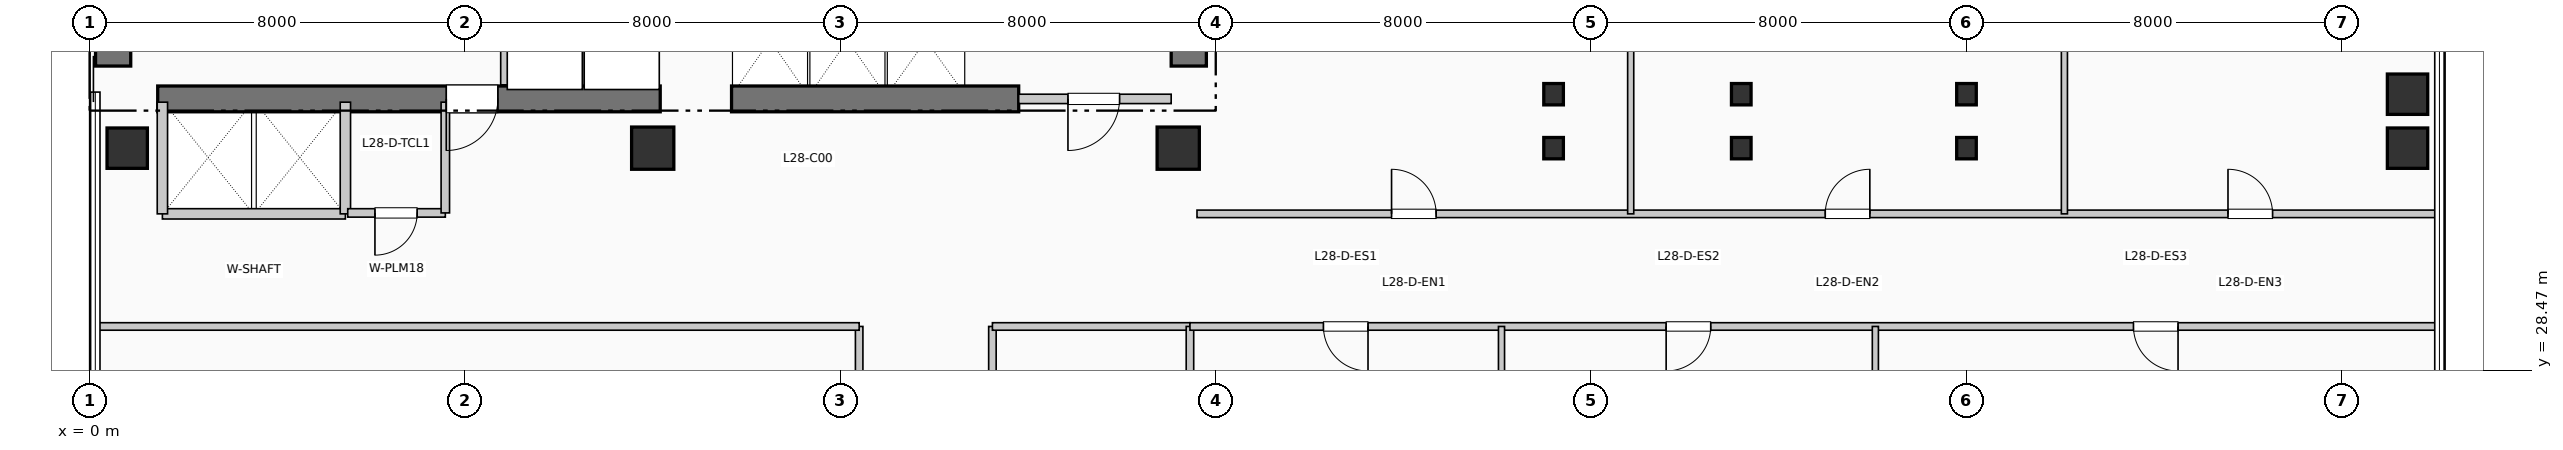
"""IFC4 building model, lengths in metres.
Left out: names, types, materials, properties, quantities, classifications, styles, units other than length and angle.
Written with IfcOpenShell. Run it as: python <this file> out.ifc"""

import sys

from ifc_helpers import new_model, si_unit, direction, frame, frame_2d, origin, origin_2d, place, context, subcontext, project, spatial, rectangle, i_section, extrude, element, fill, save


model = new_model("IFC4")
c1 = context("Model", 3, precision=1e-05, world=origin(), true_north=direction((0.0, 1.0)))
c2 = subcontext(c1, "Body", "Model", "MODEL_VIEW")
j1 = project(units=[si_unit("LENGTHUNIT", "METRE"), si_unit("PLANEANGLEUNIT", "RADIAN")], contexts=[c1])
p1 = place(None, origin())
s1 = spatial("IfcSite", under=j1, at=p1, CompositionType="ELEMENT")
p2 = place(p1, origin())
s2 = spatial("IfcBuilding", under=s1, at=p2, CompositionType="ELEMENT")
p3 = place(p2, frame((0.0, 0.0, 118.47)))
s3 = spatial("IfcBuildingStorey", under=s2, at=p3, CompositionType="ELEMENT", Elevation=118.47)
p4 = place(p3, frame((0.5, 34.95, 0.0), z_axis=(0.0, 0.0, 1.0), x_axis=(0.0, 1.0, 0.0)))
e1 = element("IfcWall", 1, at=p4, inside=s3, PredefinedType="SHEAR", context=c2, shape_type="SweptSolid", body=[
    extrude(rectangle(XDim=7.9, YDim=0.75, at=frame_2d((3.95, 0.0))), origin(), (0.0, 0.0, 1.0), 3.96),
])
p5 = place(p3, frame((23.425, 34.95, 0.0), z_axis=(0.0, 0.0, 1.0), x_axis=(0.0, 1.0, 0.0)))
e2 = element("IfcWall", 2, at=p5, inside=s3, PredefinedType="SHEAR", context=c2, shape_type="SweptSolid", body=[
    extrude(rectangle(XDim=10.64, YDim=0.75, at=frame_2d((5.32, 0.0))), origin(), (0.0, 0.0, 1.0), 3.96),
])
p6 = place(p3, frame((1.45, 34.25, 0.0), z_axis=(0.0, 0.0, 1.0), x_axis=(1.0, 0.0, 0.0)))
e3 = element("IfcWall", 3, at=p6, inside=s3, PredefinedType="SHEAR", context=c2, shape_type="SweptSolid", body=[
    extrude(rectangle(XDim=10.71, YDim=0.55, at=frame_2d((5.355, 0.0))), origin(), (0.0, 0.0, 1.0), 3.96),
])
p7 = place(p6, frame((7.25, 0.0, 0.0), z_axis=(0.0, 0.0, 1.0), x_axis=(-1.0, 0.0, 0.0)))
e4 = element("IfcOpeningElement", 4, at=p7, cuts=e3, PredefinedType="OPENING", context=c2, shape_type="SweptSolid", body=[
    extrude(rectangle(XDim=1.1, YDim=2.15, at=frame_2d((0.55, 1.075))), frame((0.0, 0.285, 0.0), z_axis=(0.0, -1.0, 0.0), x_axis=(1.0, 0.0, 0.0)), (0.0, 0.0, 1.0), 0.57),
])
p8 = place(p3, frame((13.68, 34.25, 0.0), z_axis=(0.0, 0.0, 1.0), x_axis=(1.0, 0.0, 0.0)))
e5 = element("IfcWall", 5, at=p8, inside=s3, PredefinedType="SHEAR", context=c2, shape_type="SweptSolid", body=[
    extrude(rectangle(XDim=6.12, YDim=0.55, at=frame_2d((3.06, 0.0))), origin(), (0.0, 0.0, 1.0), 3.96),
])
p9 = place(p3, frame((0.8, 33.2, 0.0), z_axis=(0.0, 0.0, 1.0), x_axis=(1.0, 0.0, 0.0)))
e6 = element("IfcColumn", 6, at=p9, inside=s3, PredefinedType="COLUMN", context=c2, shape_type="SweptSolid", body=[
    extrude(rectangle(XDim=0.86, YDim=0.86, at=origin_2d()), origin(), (0.0, 0.0, 1.0), 3.96),
])
for number, where, z_axis, x_axis in (
    (7, (12.0, 33.2, 0.0), (0.0, 0.0, 1.0), (1.0, 0.0, 0.0)),
    (8, (23.2, 33.2, 0.0), (0.0, 0.0, 1.0), (1.0, 0.0, 0.0)),
):
    element("IfcColumn", number, at=place(p3, frame(where, z_axis=z_axis, x_axis=x_axis)), inside=s3, PredefinedType="COLUMN", context=c2, shape_type="SweptSolid", body=[
        extrude(rectangle(XDim=0.9, YDim=0.9, at=origin_2d()), origin(), (0.0, 0.0, 1.0), 3.96),
    ])
for number, where, z_axis, x_axis in (
    (9, (31.2, 33.2, 0.0), (0.0, 0.0, 1.0), (1.0, 0.0, 0.0)),
    (10, (31.2, 34.35, 0.0), (0.0, 0.0, 1.0), (1.0, 0.0, 0.0)),
    (11, (35.2, 33.2, 0.0), (0.0, 0.0, 1.0), (1.0, 0.0, 0.0)),
    (12, (35.2, 34.35, 0.0), (0.0, 0.0, 1.0), (1.0, 0.0, 0.0)),
    (13, (40.0, 33.2, 0.0), (0.0, 0.0, 1.0), (1.0, 0.0, 0.0)),
    (14, (40.0, 34.35, 0.0), (0.0, 0.0, 1.0), (1.0, 0.0, 0.0)),
):
    element("IfcColumn", number, at=place(p3, frame(where, z_axis=z_axis, x_axis=x_axis)), inside=s3, PredefinedType="COLUMN", context=c2, shape_type="SweptSolid", body=[
        extrude(i_section(OverallWidth=0.418, OverallDepth=0.455, WebThickness=0.032, FlangeThickness=0.051, at=origin_2d()), origin(), (0.0, 0.0, 1.0), 3.96),
    ])
for number, where, z_axis, x_axis in (
    (15, (49.4, 33.2, 0.0), (0.0, 0.0, 1.0), (1.0, 0.0, 0.0)),
    (16, (49.4, 34.35, 0.0), (0.0, 0.0, 1.0), (1.0, 0.0, 0.0)),
):
    element("IfcColumn", number, at=place(p3, frame(where, z_axis=z_axis, x_axis=x_axis)), inside=s3, PredefinedType="COLUMN", context=c2, shape_type="SweptSolid", body=[
        extrude(rectangle(XDim=0.86, YDim=0.86, at=origin_2d()), origin(), (0.0, 0.0, 1.0), 3.96),
    ])
p10 = place(p3, frame((8.86, 34.55, 0.0), z_axis=(0.0, 0.0, 1.0), x_axis=(0.0, 1.0, 0.0)))
e17 = element("IfcWall", 17, at=p10, inside=s3, PredefinedType="PARTITIONING", context=c2, shape_type="SweptSolid", body=[
    extrude(rectangle(XDim=2.5, YDim=0.2, at=frame_2d((1.25, 0.0))), origin(), (0.0, 0.0, 1.0), 3.71),
])
p11 = place(p3, frame((19.8, 34.25, 0.0), z_axis=(0.0, 0.0, 1.0), x_axis=(1.0, 0.0, 0.0)))
e18 = element("IfcWall", 18, at=p11, inside=s3, PredefinedType="PARTITIONING", context=c2, shape_type="SweptSolid", body=[
    extrude(rectangle(XDim=3.25, YDim=0.2, at=frame_2d((1.625, 0.0))), origin(), (0.0, 0.0, 1.0), 3.71),
])
p12 = place(p11, frame((2.15, 0.0, 0.0), z_axis=(0.0, 0.0, 1.0), x_axis=(-1.0, 0.0, 0.0)))
e19 = element("IfcOpeningElement", 19, at=p12, cuts=e18, PredefinedType="OPENING", context=c2, shape_type="SweptSolid", body=[
    extrude(rectangle(XDim=1.1, YDim=2.15, at=frame_2d((0.55, 1.075))), frame((0.0, 0.11, 0.0), z_axis=(0.0, -1.0, 0.0), x_axis=(1.0, 0.0, 0.0)), (0.0, 0.0, 1.0), 0.22),
])
p13 = place(p3, frame((1.55, 31.8, 0.0), z_axis=(0.0, 0.0, 1.0), x_axis=(1.0, 0.0, 0.0)))
e20 = element("IfcWall", 20, at=p13, inside=s3, PredefinedType="PARTITIONING", context=c2, shape_type="SweptSolid", body=[
    extrude(rectangle(XDim=3.9, YDim=0.22, at=frame_2d((1.95, 0.0))), origin(), (0.0, 0.0, 1.0), 3.71),
])
for number, where, z_axis, x_axis in (
    (21, (1.55, 31.8, 0.0), (0.0, 0.0, 1.0), (0.0, 1.0, 0.0)),
    (22, (5.45, 31.8, 0.0), (0.0, 0.0, 1.0), (0.0, 1.0, 0.0)),
):
    element("IfcWall", number, at=place(p3, frame(where, z_axis=z_axis, x_axis=x_axis)), inside=s3, PredefinedType="PARTITIONING", context=c2, shape_type="SweptSolid", body=[
        extrude(rectangle(XDim=2.38, YDim=0.22, at=frame_2d((1.19, 0.0))), origin(), (0.0, 0.0, 1.0), 3.71),
    ])
p14 = place(p3, frame((5.5, 31.82, 0.0), z_axis=(0.0, 0.0, 1.0), x_axis=(1.0, 0.0, 0.0)))
e23 = element("IfcWall", 23, at=p14, inside=s3, PredefinedType="PLUMBINGWALL", context=c2, shape_type="SweptSolid", body=[
    extrude(rectangle(XDim=2.08, YDim=0.18, at=frame_2d((1.04, 0.0))), origin(), (0.0, 0.0, 1.0), 3.71),
])
p15 = place(p14, frame((1.48, 0.0, 0.0), z_axis=(0.0, 0.0, 1.0), x_axis=(-1.0, 0.0, 0.0)))
e24 = element("IfcOpeningElement", 24, at=p15, cuts=e23, PredefinedType="OPENING", context=c2, shape_type="SweptSolid", body=[
    extrude(rectangle(XDim=0.9, YDim=2.1, at=frame_2d((0.45, 1.05))), frame((0.0, 0.1, 0.0), z_axis=(0.0, -1.0, 0.0), x_axis=(1.0, 0.0, 0.0)), (0.0, 0.0, 1.0), 0.2),
])
p16 = place(p3, frame((7.58, 31.82, 0.0), z_axis=(0.0, 0.0, 1.0), x_axis=(0.0, 1.0, 0.0)))
e25 = element("IfcWall", 25, at=p16, inside=s3, PredefinedType="PLUMBINGWALL", context=c2, shape_type="SweptSolid", body=[
    extrude(rectangle(XDim=2.36, YDim=0.18, at=frame_2d((1.18, 0.0))), origin(), (0.0, 0.0, 1.0), 3.71),
])
p17 = place(p3, frame((16.4, 7.2, 0.0), z_axis=(0.0, 0.0, 1.0), x_axis=(0.0, 1.0, 0.0)))
e26 = element("IfcWall", 26, at=p17, inside=s3, PredefinedType="PARTITIONING", context=c2, shape_type="SweptSolid", body=[
    extrude(rectangle(XDim=22.2, YDim=0.16, at=frame_2d((11.1, 0.0))), origin(), (0.0, 0.0, 1.0), 3.71),
])
p18 = place(p17, frame((6.247, 0.0, 0.0), z_axis=(0.0, 0.0, 1.0), x_axis=(-1.0, 0.0, 0.0)))
e27 = element("IfcOpeningElement", 27, at=p18, cuts=e26, PredefinedType="OPENING", context=c2, shape_type="SweptSolid", body=[
    extrude(rectangle(XDim=0.95, YDim=2.15, at=frame_2d((0.475, 1.075))), frame((0.0, 0.09, 0.0), z_axis=(0.0, -1.0, 0.0), x_axis=(1.0, 0.0, 0.0)), (0.0, 0.0, 1.0), 0.18),
])
p19 = place(p17, frame((17.347, 0.0, 0.0), z_axis=(0.0, 0.0, 1.0), x_axis=(-1.0, 0.0, 0.0)))
e28 = element("IfcOpeningElement", 28, at=p19, cuts=e26, PredefinedType="OPENING", context=c2, shape_type="SweptSolid", body=[
    extrude(rectangle(XDim=0.95, YDim=2.15, at=frame_2d((0.475, 1.075))), frame((0.0, 0.09, 0.0), z_axis=(0.0, -1.0, 0.0), x_axis=(1.0, 0.0, 0.0)), (0.0, 0.0, 1.0), 0.18),
])
p20 = place(p3, frame((19.24, 7.2, 0.0), z_axis=(0.0, 0.0, 1.0), x_axis=(0.0, 1.0, 0.0)))
e29 = element("IfcWall", 29, at=p20, inside=s3, PredefinedType="PARTITIONING", context=c2, shape_type="SweptSolid", body=[
    extrude(rectangle(XDim=22.2, YDim=0.16, at=frame_2d((11.1, 0.0))), origin(), (0.0, 0.0, 1.0), 3.71),
])
p21 = place(p20, frame((4.52, 0.0, 0.0)))
e30 = element("IfcOpeningElement", 30, at=p21, cuts=e29, PredefinedType="OPENING", context=c2, shape_type="SweptSolid", body=[
    extrude(rectangle(XDim=0.95, YDim=2.15, at=frame_2d((0.475, 1.075))), frame((0.0, 0.09, 0.0), z_axis=(0.0, -1.0, 0.0), x_axis=(1.0, 0.0, 0.0)), (0.0, 0.0, 1.0), 0.18),
])
p22 = place(p20, frame((15.62, 0.0, 0.0)))
e31 = element("IfcOpeningElement", 31, at=p22, cuts=e29, PredefinedType="OPENING", context=c2, shape_type="SweptSolid", body=[
    extrude(rectangle(XDim=0.95, YDim=2.15, at=frame_2d((0.475, 1.075))), frame((0.0, 0.09, 0.0), z_axis=(0.0, -1.0, 0.0), x_axis=(1.0, 0.0, 0.0)), (0.0, 0.0, 1.0), 0.18),
])
p23 = place(p3, frame((0.19, 29.4, 0.0), z_axis=(0.0, 0.0, 1.0), x_axis=(1.0, 0.0, 0.0)))
e32 = element("IfcWall", 32, at=p23, inside=s3, PredefinedType="PARTITIONING", context=c2, shape_type="SweptSolid", body=[
    extrude(rectangle(XDim=16.21, YDim=0.16, at=frame_2d((8.105, 0.0))), origin(), (0.0, 0.0, 1.0), 3.365),
])
p24 = place(p3, frame((19.24, 29.4, 0.0), z_axis=(0.0, 0.0, 1.0), x_axis=(1.0, 0.0, 0.0)))
e33 = element("IfcWall", 33, at=p24, inside=s3, PredefinedType="PARTITIONING", context=c2, shape_type="SweptSolid", body=[
    extrude(rectangle(XDim=4.21, YDim=0.16, at=frame_2d((2.105, 0.0))), origin(), (0.0, 0.0, 1.0), 3.71),
])
p25 = place(p3, frame((23.45, 1.04, 0.0), z_axis=(0.0, 0.0, 1.0), x_axis=(0.0, 1.0, 0.0)))
e34 = element("IfcWall", 34, at=p25, inside=s3, PredefinedType="PARTITIONING", context=c2, shape_type="SweptSolid", body=[
    extrude(rectangle(XDim=28.36, YDim=0.16, at=frame_2d((14.18, 0.0))), origin(), (0.0, 0.0, 1.0), 3.045),
])
p26 = place(p3, frame((23.45, 29.4, 0.0), z_axis=(0.0, 0.0, 1.0), x_axis=(1.0, 0.0, 0.0)))
e35 = element("IfcWall", 35, at=p26, inside=s3, PredefinedType="PARTITIONING", context=c2, shape_type="SweptSolid", body=[
    extrude(rectangle(XDim=26.56, YDim=0.16, at=frame_2d((13.28, 0.0))), origin(), (0.0, 0.0, 1.0), 3.365),
])
p27 = place(p26, frame((3.795, 0.0, 0.0), z_axis=(0.0, 0.0, 1.0), x_axis=(-1.0, 0.0, 0.0)))
e36 = element("IfcOpeningElement", 36, at=p27, cuts=e35, PredefinedType="OPENING", context=c2, shape_type="SweptSolid", body=[
    extrude(rectangle(XDim=0.95, YDim=2.15, at=frame_2d((0.475, 1.075))), frame((0.0, 0.09, 0.0), z_axis=(0.0, -1.0, 0.0), x_axis=(1.0, 0.0, 0.0)), (0.0, 0.0, 1.0), 0.18),
])
p28 = place(p26, frame((11.099, 0.0, 0.0), z_axis=(0.0, 0.0, 1.0), x_axis=(-1.0, 0.0, 0.0)))
e37 = element("IfcOpeningElement", 37, at=p28, cuts=e35, PredefinedType="OPENING", context=c2, shape_type="SweptSolid", body=[
    extrude(rectangle(XDim=0.95, YDim=2.15, at=frame_2d((0.475, 1.075))), frame((0.0, 0.09, 0.0), z_axis=(0.0, -1.0, 0.0), x_axis=(1.0, 0.0, 0.0)), (0.0, 0.0, 1.0), 0.18),
])
p29 = place(p26, frame((21.059, 0.0, 0.0), z_axis=(0.0, 0.0, 1.0), x_axis=(-1.0, 0.0, 0.0)))
e38 = element("IfcOpeningElement", 38, at=p29, cuts=e35, PredefinedType="OPENING", context=c2, shape_type="SweptSolid", body=[
    extrude(rectangle(XDim=0.95, YDim=2.15, at=frame_2d((0.475, 1.075))), frame((0.0, 0.09, 0.0), z_axis=(0.0, -1.0, 0.0), x_axis=(1.0, 0.0, 0.0)), (0.0, 0.0, 1.0), 0.18),
])
p30 = place(p3, frame((23.6, 31.8, 0.0), z_axis=(0.0, 0.0, 1.0), x_axis=(1.0, 0.0, 0.0)))
e39 = element("IfcWall", 39, at=p30, inside=s3, PredefinedType="PARTITIONING", context=c2, shape_type="SweptSolid", body=[
    extrude(rectangle(XDim=26.41, YDim=0.16, at=frame_2d((13.205, 0.0))), origin(), (0.0, 0.0, 1.0), 3.71),
])
p31 = place(p30, frame((4.147, 0.0, 0.0)))
e40 = element("IfcOpeningElement", 40, at=p31, cuts=e39, PredefinedType="OPENING", context=c2, shape_type="SweptSolid", body=[
    extrude(rectangle(XDim=0.95, YDim=2.15, at=frame_2d((0.475, 1.075))), frame((0.0, 0.09, 0.0), z_axis=(0.0, -1.0, 0.0), x_axis=(1.0, 0.0, 0.0)), (0.0, 0.0, 1.0), 0.18),
])
p32 = place(p30, frame((13.39, 0.0, 0.0)))
e41 = element("IfcOpeningElement", 41, at=p32, cuts=e39, PredefinedType="OPENING", context=c2, shape_type="SweptSolid", body=[
    extrude(rectangle(XDim=0.95, YDim=2.15, at=frame_2d((0.475, 1.075))), frame((0.0, 0.09, 0.0), z_axis=(0.0, -1.0, 0.0), x_axis=(1.0, 0.0, 0.0)), (0.0, 0.0, 1.0), 0.18),
])
p33 = place(p30, frame((21.973, 0.0, 0.0)))
e42 = element("IfcOpeningElement", 42, at=p33, cuts=e39, PredefinedType="OPENING", context=c2, shape_type="SweptSolid", body=[
    extrude(rectangle(XDim=0.95, YDim=2.15, at=frame_2d((0.475, 1.075))), frame((0.0, 0.09, 0.0), z_axis=(0.0, -1.0, 0.0), x_axis=(1.0, 0.0, 0.0)), (0.0, 0.0, 1.0), 0.18),
])
for number, where, z_axis, x_axis in (
    (43, (30.09, 22.19, 0.0), (0.0, 0.0, 1.0), (0.0, 1.0, 0.0)),
    (44, (38.058, 22.19, 0.0), (0.0, 0.0, 1.0), (0.0, 1.0, 0.0)),
):
    element("IfcWall", number, at=place(p3, frame(where, z_axis=z_axis, x_axis=x_axis)), inside=s3, PredefinedType="PARTITIONING", context=c2, shape_type="SweptSolid", body=[
        extrude(rectangle(XDim=7.21, YDim=0.13, at=frame_2d((3.605, 0.0))), origin(), (0.0, 0.0, 1.0), 3.71),
    ])
for number, where, z_axis, x_axis in (
    (45, (32.844, 31.8, 0.0), (0.0, 0.0, 1.0), (0.0, 1.0, 0.0)),
    (46, (42.087, 31.8, 0.0), (0.0, 0.0, 1.0), (0.0, 1.0, 0.0)),
):
    element("IfcWall", number, at=place(p3, frame(where, z_axis=z_axis, x_axis=x_axis)), inside=s3, PredefinedType="PARTITIONING", context=c2, shape_type="SweptSolid", body=[
        extrude(rectangle(XDim=14.01, YDim=0.13, at=frame_2d((7.005, 0.0))), origin(), (0.0, 0.0, 1.0), 3.71),
    ])
p34 = place(p7, origin())
e47 = element("IfcDoor", 47, at=p34, inside=s3, OperationType="SINGLE_SWING_LEFT", PredefinedType="DOOR", context=c2, shape_type="SweptSolid", body=[
    extrude(rectangle(XDim=1.1, YDim=2.15, at=frame_2d((0.55, 1.075))), frame((0.0, 0.025, 0.0), z_axis=(0.0, -1.0, 0.0), x_axis=(1.0, 0.0, 0.0)), (0.0, 0.0, 1.0), 0.05),
])
fill(e4, e47)
p35 = place(p12, origin())
e48 = element("IfcDoor", 48, at=p35, inside=s3, OperationType="SINGLE_SWING_LEFT", PredefinedType="DOOR", context=c2, shape_type="SweptSolid", body=[
    extrude(rectangle(XDim=1.1, YDim=2.15, at=frame_2d((0.55, 1.075))), frame((0.0, 0.025, 0.0), z_axis=(0.0, -1.0, 0.0), x_axis=(1.0, 0.0, 0.0)), (0.0, 0.0, 1.0), 0.05),
])
fill(e19, e48)
p36 = place(p15, origin())
e49 = element("IfcDoor", 49, at=p36, inside=s3, OperationType="SINGLE_SWING_LEFT", PredefinedType="DOOR", context=c2, shape_type="SweptSolid", body=[
    extrude(rectangle(XDim=0.9, YDim=2.1, at=frame_2d((0.45, 1.05))), frame((0.0, 0.025, 0.0), z_axis=(0.0, -1.0, 0.0), x_axis=(1.0, 0.0, 0.0)), (0.0, 0.0, 1.0), 0.05),
])
fill(e24, e49)
p37 = place(p27, origin())
e50 = element("IfcDoor", 50, at=p37, inside=s3, OperationType="SINGLE_SWING_RIGHT", PredefinedType="DOOR", context=c2, shape_type="SweptSolid", body=[
    extrude(rectangle(XDim=0.95, YDim=2.15, at=frame_2d((0.475, 1.075))), frame((0.0, 0.025, 0.0), z_axis=(0.0, -1.0, 0.0), x_axis=(1.0, 0.0, 0.0)), (0.0, 0.0, 1.0), 0.05),
])
fill(e36, e50)
p38 = place(p28, origin())
e51 = element("IfcDoor", 51, at=p38, inside=s3, OperationType="SINGLE_SWING_LEFT", PredefinedType="DOOR", context=c2, shape_type="SweptSolid", body=[
    extrude(rectangle(XDim=0.95, YDim=2.15, at=frame_2d((0.475, 1.075))), frame((0.0, 0.025, 0.0), z_axis=(0.0, -1.0, 0.0), x_axis=(1.0, 0.0, 0.0)), (0.0, 0.0, 1.0), 0.05),
])
fill(e37, e51)
p39 = place(p29, origin())
e52 = element("IfcDoor", 52, at=p39, inside=s3, OperationType="SINGLE_SWING_RIGHT", PredefinedType="DOOR", context=c2, shape_type="SweptSolid", body=[
    extrude(rectangle(XDim=0.95, YDim=2.15, at=frame_2d((0.475, 1.075))), frame((0.0, 0.025, 0.0), z_axis=(0.0, -1.0, 0.0), x_axis=(1.0, 0.0, 0.0)), (0.0, 0.0, 1.0), 0.05),
])
fill(e38, e52)
p40 = place(p31, origin())
e53 = element("IfcDoor", 53, at=p40, inside=s3, OperationType="SINGLE_SWING_LEFT", PredefinedType="DOOR", context=c2, shape_type="SweptSolid", body=[
    extrude(rectangle(XDim=0.95, YDim=2.15, at=frame_2d((0.475, 1.075))), frame((0.0, 0.025, 0.0), z_axis=(0.0, -1.0, 0.0), x_axis=(1.0, 0.0, 0.0)), (0.0, 0.0, 1.0), 0.05),
])
fill(e40, e53)
p41 = place(p32, origin())
e54 = element("IfcDoor", 54, at=p41, inside=s3, OperationType="SINGLE_SWING_RIGHT", PredefinedType="DOOR", context=c2, shape_type="SweptSolid", body=[
    extrude(rectangle(XDim=0.95, YDim=2.15, at=frame_2d((0.475, 1.075))), frame((0.0, 0.025, 0.0), z_axis=(0.0, -1.0, 0.0), x_axis=(1.0, 0.0, 0.0)), (0.0, 0.0, 1.0), 0.05),
])
fill(e41, e54)
p42 = place(p33, origin())
e55 = element("IfcDoor", 55, at=p42, inside=s3, OperationType="SINGLE_SWING_LEFT", PredefinedType="DOOR", context=c2, shape_type="SweptSolid", body=[
    extrude(rectangle(XDim=0.95, YDim=2.15, at=frame_2d((0.475, 1.075))), frame((0.0, 0.025, 0.0), z_axis=(0.0, -1.0, 0.0), x_axis=(1.0, 0.0, 0.0)), (0.0, 0.0, 1.0), 0.05),
])
fill(e42, e55)
save(model, sys.argv[1])
